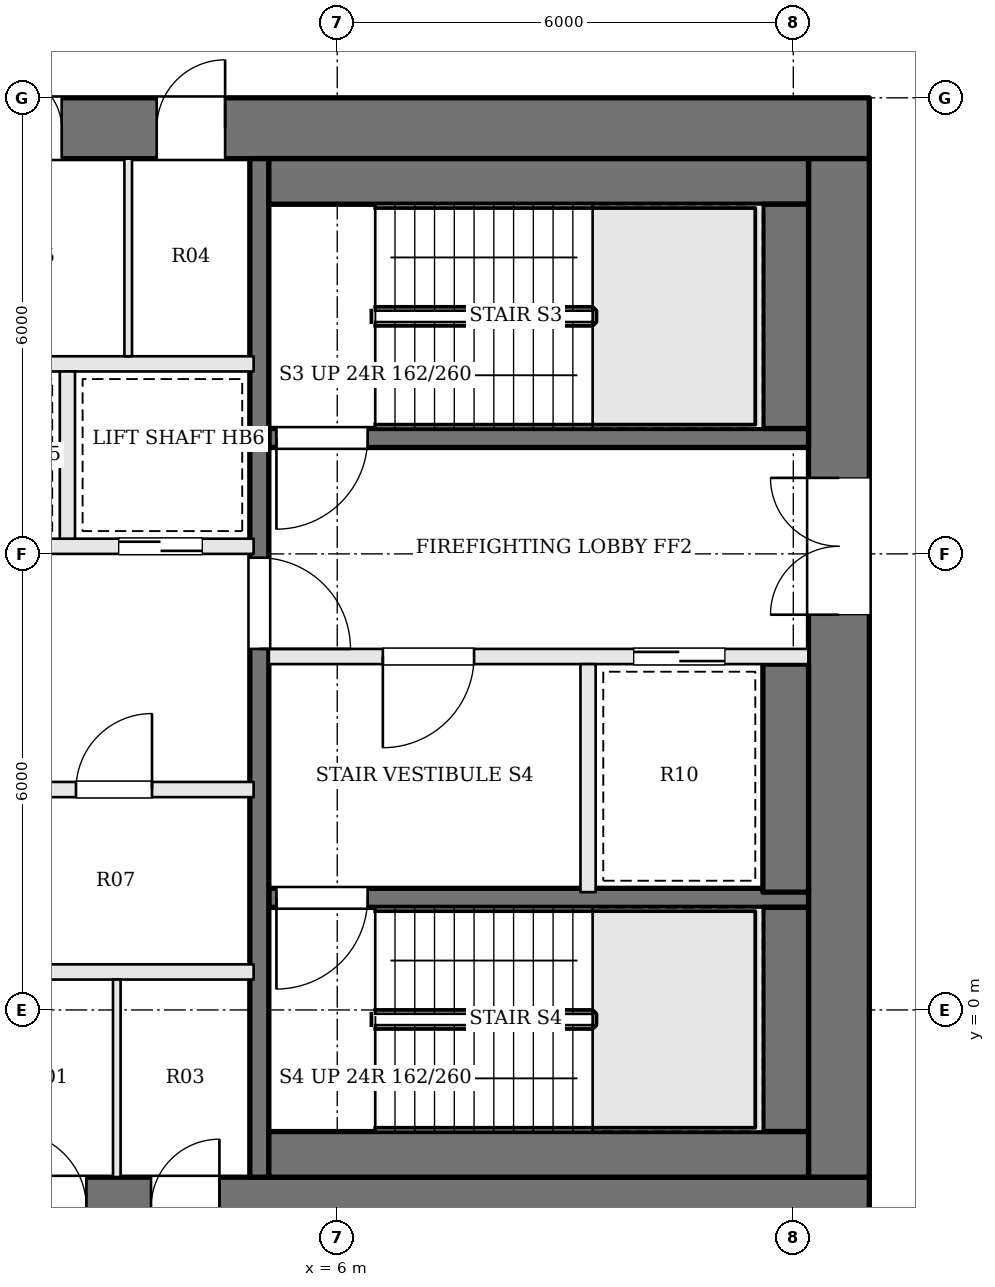
"""IFC4 building model, lengths in metres.
Left out: names, types, materials, properties, quantities, classifications, styles, units other than length and angle.
Written with IfcOpenShell. Run it as: python <this file> out.ifc"""

import sys

from ifc_helpers import new_model, si_unit, direction, frame, frame_2d, origin, place, context, subcontext, project, spatial, rectangle, extrude, element, fill, save


model = new_model("IFC4")
c1 = context("Model", 3, precision=1e-05, world=origin(), true_north=direction((0.0, 1.0)))
c2 = subcontext(c1, "Body", "Model", "MODEL_VIEW")
j1 = project(units=[si_unit("LENGTHUNIT", "METRE"), si_unit("PLANEANGLEUNIT", "RADIAN")], contexts=[c1])
p1 = place(None, origin())
s1 = spatial("IfcSite", under=j1, at=p1, CompositionType="ELEMENT")
p2 = place(p1, origin())
s2 = spatial("IfcBuilding", under=s1, at=p2, CompositionType="ELEMENT")
p3 = place(p2, frame((0.0, 0.0, 201.3)))
s3 = spatial("IfcBuildingStorey", under=s2, at=p3, CompositionType="ELEMENT", Elevation=201.3)
p4 = place(p3, frame((-13.0, 11.6, 0.0), z_axis=(0.0, 0.0, 1.0), x_axis=(1.0, 0.0, 0.0)))
e1 = element("IfcWall", 1, at=p4, inside=s3, PredefinedType="SHEAR", context=c2, shape_type="SweptSolid", body=[
    extrude(rectangle(XDim=26.0, YDim=0.8, at=frame_2d((13.0, 0.0))), origin(), (0.0, 0.0, 1.0), 3.9),
])
p5 = place(p4, frame((9.375, 0.0, 0.0)))
e2 = element("IfcOpeningElement", 2, at=p5, cuts=e1, PredefinedType="OPENING", context=c2, shape_type="SweptSolid", body=[
    extrude(rectangle(XDim=0.7, YDim=2.1, at=frame_2d((0.35, 1.05))), frame((0.0, 0.41, 0.0), z_axis=(0.0, -1.0, 0.0), x_axis=(1.0, 0.0, 0.0)), (0.0, 0.0, 1.0), 0.82),
])
p6 = place(p4, frame((12.075, 0.0, 0.0)))
e3 = element("IfcOpeningElement", 3, at=p6, cuts=e1, PredefinedType="OPENING", context=c2, shape_type="SweptSolid", body=[
    extrude(rectangle(XDim=1.0, YDim=2.1, at=frame_2d((0.5, 1.05))), frame((0.0, 0.41, 0.0), z_axis=(0.0, -1.0, 0.0), x_axis=(1.0, 0.0, 0.0)), (0.0, 0.0, 1.0), 0.82),
])
p7 = place(p4, frame((14.675, 0.0, 0.0)))
e4 = element("IfcOpeningElement", 4, at=p7, cuts=e1, PredefinedType="OPENING", context=c2, shape_type="SweptSolid", body=[
    extrude(rectangle(XDim=0.7, YDim=2.1, at=frame_2d((0.35, 1.05))), frame((0.0, 0.41, 0.0), z_axis=(0.0, -1.0, 0.0), x_axis=(1.0, 0.0, 0.0)), (0.0, 0.0, 1.0), 0.82),
])
p8 = place(p4, frame((16.625, 0.0, 0.0)))
e5 = element("IfcOpeningElement", 5, at=p8, cuts=e1, PredefinedType="OPENING", context=c2, shape_type="SweptSolid", body=[
    extrude(rectangle(XDim=0.9, YDim=2.1, at=frame_2d((0.45, 1.05))), frame((0.0, 0.41, 0.0), z_axis=(0.0, -1.0, 0.0), x_axis=(1.0, 0.0, 0.0)), (0.0, 0.0, 1.0), 0.82),
])
p9 = place(p3, frame((-13.0, -2.6, 0.0), z_axis=(0.0, 0.0, 1.0), x_axis=(1.0, 0.0, 0.0)))
e6 = element("IfcWall", 6, at=p9, inside=s3, PredefinedType="SHEAR", context=c2, shape_type="SweptSolid", body=[
    extrude(rectangle(XDim=26.0, YDim=0.8, at=frame_2d((13.0, 0.0))), origin(), (0.0, 0.0, 1.0), 3.9),
])
p10 = place(p9, frame((9.2, 0.0, 0.0)))
e7 = element("IfcOpeningElement", 7, at=p10, cuts=e6, PredefinedType="OPENING", context=c2, shape_type="SweptSolid", body=[
    extrude(rectangle(XDim=0.9, YDim=2.1, at=frame_2d((0.45, 1.05))), frame((0.0, 0.41, 0.0), z_axis=(0.0, -1.0, 0.0), x_axis=(1.0, 0.0, 0.0)), (0.0, 0.0, 1.0), 0.82),
])
p11 = place(p9, frame((12.3, 0.0, 0.0)))
e8 = element("IfcOpeningElement", 8, at=p11, cuts=e6, PredefinedType="OPENING", context=c2, shape_type="SweptSolid", body=[
    extrude(rectangle(XDim=0.9, YDim=2.1, at=frame_2d((0.45, 1.05))), frame((0.0, 0.41, 0.0), z_axis=(0.0, -1.0, 0.0), x_axis=(1.0, 0.0, 0.0)), (0.0, 0.0, 1.0), 0.82),
])
p12 = place(p9, frame((14.7, 0.0, 0.0)))
e9 = element("IfcOpeningElement", 9, at=p12, cuts=e6, PredefinedType="OPENING", context=c2, shape_type="SweptSolid", body=[
    extrude(rectangle(XDim=1.0, YDim=2.1, at=frame_2d((0.5, 1.05))), frame((0.0, 0.41, 0.0), z_axis=(0.0, -1.0, 0.0), x_axis=(1.0, 0.0, 0.0)), (0.0, 0.0, 1.0), 0.82),
])
p13 = place(p9, frame((16.55, 0.0, 0.0)))
e10 = element("IfcOpeningElement", 10, at=p13, cuts=e6, PredefinedType="OPENING", context=c2, shape_type="SweptSolid", body=[
    extrude(rectangle(XDim=0.9, YDim=2.1, at=frame_2d((0.45, 1.05))), frame((0.0, 0.41, 0.0), z_axis=(0.0, -1.0, 0.0), x_axis=(1.0, 0.0, 0.0)), (0.0, 0.0, 1.0), 0.82),
])
p14 = place(p3, frame((12.6, -2.2, 0.0), z_axis=(0.0, 0.0, 1.0), x_axis=(0.0, 1.0, 0.0)))
e11 = element("IfcWall", 11, at=p14, inside=s3, PredefinedType="SHEAR", context=c2, shape_type="SweptSolid", body=[
    extrude(rectangle(XDim=13.4, YDim=0.8, at=frame_2d((6.7, 0.0))), origin(), (0.0, 0.0, 1.0), 3.9),
])
p15 = place(p14, frame((7.4, 0.0, 0.0)))
e12 = element("IfcOpeningElement", 12, at=p15, cuts=e11, PredefinedType="OPENING", context=c2, shape_type="SweptSolid", body=[
    extrude(rectangle(XDim=1.8, YDim=2.1, at=frame_2d((0.9, 1.05))), frame((0.0, 0.41, 0.0), z_axis=(0.0, -1.0, 0.0), x_axis=(1.0, 0.0, 0.0)), (0.0, 0.0, 1.0), 0.82),
])
p16 = place(p3, frame((12.2, 7.525, 0.0), z_axis=(0.0, 0.0, 1.0), x_axis=(-1.0, 0.0, 0.0)))
e13 = element("IfcWall", 13, at=p16, inside=s3, PredefinedType="SOLIDWALL", context=c2, shape_type="SweptSolid", body=[
    extrude(rectangle(XDim=7.1, YDim=0.25, at=frame_2d((3.55, 0.0))), origin(), (0.0, 0.0, 1.0), 3.7),
])
p17 = place(p16, frame((5.8, 0.0, 0.0)))
e14 = element("IfcOpeningElement", 14, at=p17, cuts=e13, PredefinedType="OPENING", context=c2, shape_type="SweptSolid", body=[
    extrude(rectangle(XDim=1.2, YDim=2.1, at=frame_2d((0.6, 1.05))), frame((0.0, 0.135, 0.0), z_axis=(0.0, -1.0, 0.0), x_axis=(1.0, 0.0, 0.0)), (0.0, 0.0, 1.0), 0.27),
])
p18 = place(p3, frame((12.2, 4.65, 0.0), z_axis=(0.0, 0.0, 1.0), x_axis=(-1.0, 0.0, 0.0)))
e15 = element("IfcWall", 15, at=p18, inside=s3, PredefinedType="SOLIDWALL", context=c2, shape_type="SweptSolid", body=[
    extrude(rectangle(XDim=7.1, YDim=0.2, at=frame_2d((3.55, 0.0))), origin(), (0.0, 0.0, 1.0), 3.7),
])
p19 = place(p18, frame((4.4, 0.0, 0.0)))
e16 = element("IfcOpeningElement", 16, at=p19, cuts=e15, PredefinedType="OPENING", context=c2, shape_type="SweptSolid", body=[
    extrude(rectangle(XDim=1.2, YDim=2.1, at=frame_2d((0.6, 1.05))), frame((0.0, 0.11, 0.0), z_axis=(0.0, -1.0, 0.0), x_axis=(1.0, 0.0, 0.0)), (0.0, 0.0, 1.0), 0.22),
])
p20 = place(p18, frame((1.1, 0.0, 0.0)))
e17 = element("IfcOpeningElement", 17, at=p20, cuts=e15, PredefinedType="OPENING", context=c2, shape_type="SweptSolid", body=[
    extrude(rectangle(XDim=1.2, YDim=2.1, at=frame_2d((0.6, 1.05))), frame((0.0, 0.11, 0.0), z_axis=(0.0, -1.0, 0.0), x_axis=(1.0, 0.0, 0.0)), (0.0, 0.0, 1.0), 0.22),
])
p21 = place(p3, frame((12.2, 1.475, 0.0), z_axis=(0.0, 0.0, 1.0), x_axis=(-1.0, 0.0, 0.0)))
e18 = element("IfcWall", 18, at=p21, inside=s3, PredefinedType="SOLIDWALL", context=c2, shape_type="SweptSolid", body=[
    extrude(rectangle(XDim=7.1, YDim=0.25, at=frame_2d((3.55, 0.0))), origin(), (0.0, 0.0, 1.0), 3.7),
])
p22 = place(p21, frame((5.8, 0.0, 0.0)))
e19 = element("IfcOpeningElement", 19, at=p22, cuts=e18, PredefinedType="OPENING", context=c2, shape_type="SweptSolid", body=[
    extrude(rectangle(XDim=1.2, YDim=2.1, at=frame_2d((0.6, 1.05))), frame((0.0, 0.135, 0.0), z_axis=(0.0, -1.0, 0.0), x_axis=(1.0, 0.0, 0.0)), (0.0, 0.0, 1.0), 0.27),
])
p23 = place(p3, frame((9.3, 4.55, 0.0), z_axis=(0.0, 0.0, 1.0), x_axis=(0.0, -1.0, 0.0)))
e20 = element("IfcWall", 20, at=p23, inside=s3, PredefinedType="SOLIDWALL", context=c2, shape_type="SweptSolid", body=[
    extrude(rectangle(XDim=3.0, YDim=0.2, at=frame_2d((1.5, 0.0))), origin(), (0.0, 0.0, 1.0), 3.7),
])
p24 = place(p3, frame((4.975, 11.2, 0.0), z_axis=(0.0, 0.0, 1.0), x_axis=(0.0, -1.0, 0.0)))
e21 = element("IfcWall", 21, at=p24, inside=s3, PredefinedType="SOLIDWALL", context=c2, shape_type="SweptSolid", body=[
    extrude(rectangle(XDim=13.4, YDim=0.25, at=frame_2d((6.7, 0.0))), origin(), (0.0, 0.0, 1.0), 3.7),
])
p25 = place(p24, frame((5.25, 0.0, 0.0)))
e22 = element("IfcOpeningElement", 22, at=p25, cuts=e21, PredefinedType="OPENING", context=c2, shape_type="SweptSolid", body=[
    extrude(rectangle(XDim=1.2, YDim=2.1, at=frame_2d((0.6, 1.05))), frame((0.0, 0.135, 0.0), z_axis=(0.0, -1.0, 0.0), x_axis=(1.0, 0.0, 0.0)), (0.0, 0.0, 1.0), 0.27),
])
p26 = place(p3, frame((12.2, 10.9, 0.0), z_axis=(0.0, 0.0, 1.0), x_axis=(-1.0, 0.0, 0.0)))
e23 = element("IfcWall", 23, at=p26, inside=s3, PredefinedType="SOLIDWALL", context=c2, shape_type="SweptSolid", body=[
    extrude(rectangle(XDim=7.1, YDim=0.6, at=frame_2d((3.55, 0.0))), origin(), (0.0, 0.0, 1.0), 3.7),
])
p27 = place(p3, frame((11.9, 10.6, 0.0), z_axis=(0.0, 0.0, 1.0), x_axis=(0.0, -1.0, 0.0)))
e24 = element("IfcWall", 24, at=p27, inside=s3, PredefinedType="SOLIDWALL", context=c2, shape_type="SweptSolid", body=[
    extrude(rectangle(XDim=2.95, YDim=0.6, at=frame_2d((1.475, 0.0))), origin(), (0.0, 0.0, 1.0), 3.7),
])
p28 = place(p3, frame((11.9, 4.55, 0.0), z_axis=(0.0, 0.0, 1.0), x_axis=(0.0, -1.0, 0.0)))
e25 = element("IfcWall", 25, at=p28, inside=s3, PredefinedType="SOLIDWALL", context=c2, shape_type="SweptSolid", body=[
    extrude(rectangle(XDim=3.0, YDim=0.6, at=frame_2d((1.5, 0.0))), origin(), (0.0, 0.0, 1.0), 3.7),
])
p29 = place(p3, frame((11.9, 1.35, 0.0), z_axis=(0.0, 0.0, 1.0), x_axis=(0.0, -1.0, 0.0)))
e26 = element("IfcWall", 26, at=p29, inside=s3, PredefinedType="SOLIDWALL", context=c2, shape_type="SweptSolid", body=[
    extrude(rectangle(XDim=2.95, YDim=0.6, at=frame_2d((1.475, 0.0))), origin(), (0.0, 0.0, 1.0), 3.7),
])
p30 = place(p3, frame((12.2, -1.9, 0.0), z_axis=(0.0, 0.0, 1.0), x_axis=(-1.0, 0.0, 0.0)))
e27 = element("IfcWall", 27, at=p30, inside=s3, PredefinedType="SOLIDWALL", context=c2, shape_type="SweptSolid", body=[
    extrude(rectangle(XDim=7.1, YDim=0.6, at=frame_2d((3.55, 0.0))), origin(), (0.0, 0.0, 1.0), 3.7),
])
p31 = place(p3, frame((-4.9, 0.5, 0.0), z_axis=(0.0, 0.0, 1.0), x_axis=(1.0, 0.0, 0.0)))
e28 = element("IfcWall", 28, at=p31, inside=s3, PredefinedType="SOLIDWALL", context=c2, shape_type="SweptSolid", body=[
    extrude(rectangle(XDim=9.8, YDim=0.2, at=frame_2d((4.9, 0.0))), origin(), (0.0, 0.0, 1.0), 3.7),
])
p32 = place(p3, frame((-4.9, 2.9, 0.0), z_axis=(0.0, 0.0, 1.0), x_axis=(1.0, 0.0, 0.0)))
e29 = element("IfcWall", 29, at=p32, inside=s3, PredefinedType="SOLIDWALL", context=c2, shape_type="SweptSolid", body=[
    extrude(rectangle(XDim=9.8, YDim=0.2, at=frame_2d((4.9, 0.0))), origin(), (0.0, 0.0, 1.0), 3.7),
])
p33 = place(p32, frame((0.675, 0.0, 0.0)))
e30 = element("IfcOpeningElement", 30, at=p33, cuts=e29, PredefinedType="OPENING", context=c2, shape_type="SweptSolid", body=[
    extrude(rectangle(XDim=1.1, YDim=2.1, at=frame_2d((0.55, 1.05))), frame((0.0, 0.11, 0.0), z_axis=(0.0, -1.0, 0.0), x_axis=(1.0, 0.0, 0.0)), (0.0, 0.0, 1.0), 0.22),
])
p34 = place(p32, frame((2.613, 0.0, 0.0)))
e31 = element("IfcOpeningElement", 31, at=p34, cuts=e29, PredefinedType="OPENING", context=c2, shape_type="SweptSolid", body=[
    extrude(rectangle(XDim=0.9, YDim=2.1, at=frame_2d((0.45, 1.05))), frame((0.0, 0.11, 0.0), z_axis=(0.0, -1.0, 0.0), x_axis=(1.0, 0.0, 0.0)), (0.0, 0.0, 1.0), 0.22),
])
p35 = place(p32, frame((4.35, 0.0, 0.0)))
e32 = element("IfcOpeningElement", 32, at=p35, cuts=e29, PredefinedType="OPENING", context=c2, shape_type="SweptSolid", body=[
    extrude(rectangle(XDim=1.1, YDim=2.1, at=frame_2d((0.55, 1.05))), frame((0.0, 0.11, 0.0), z_axis=(0.0, -1.0, 0.0), x_axis=(1.0, 0.0, 0.0)), (0.0, 0.0, 1.0), 0.22),
])
p36 = place(p32, frame((7.463, 0.0, 0.0)))
e33 = element("IfcOpeningElement", 33, at=p36, cuts=e29, PredefinedType="OPENING", context=c2, shape_type="SweptSolid", body=[
    extrude(rectangle(XDim=1.0, YDim=2.1, at=frame_2d((0.5, 1.05))), frame((0.0, 0.11, 0.0), z_axis=(0.0, -1.0, 0.0), x_axis=(1.0, 0.0, 0.0)), (0.0, 0.0, 1.0), 0.22),
])
p37 = place(p3, frame((-4.9, 6.1, 0.0), z_axis=(0.0, 0.0, 1.0), x_axis=(1.0, 0.0, 0.0)))
e34 = element("IfcWall", 34, at=p37, inside=s3, PredefinedType="SOLIDWALL", context=c2, shape_type="SweptSolid", body=[
    extrude(rectangle(XDim=9.8, YDim=0.2, at=frame_2d((4.9, 0.0))), origin(), (0.0, 0.0, 1.0), 3.7),
])
p38 = place(p37, frame((0.675, 0.0, 0.0)))
e35 = element("IfcOpeningElement", 35, at=p38, cuts=e34, PredefinedType="OPENING", context=c2, shape_type="SweptSolid", body=[
    extrude(rectangle(XDim=1.1, YDim=2.1, at=frame_2d((0.55, 1.05))), frame((0.0, 0.11, 0.0), z_axis=(0.0, -1.0, 0.0), x_axis=(1.0, 0.0, 0.0)), (0.0, 0.0, 1.0), 0.22),
])
p39 = place(p37, frame((3.125, 0.0, 0.0)))
e36 = element("IfcOpeningElement", 36, at=p39, cuts=e34, PredefinedType="OPENING", context=c2, shape_type="SweptSolid", body=[
    extrude(rectangle(XDim=1.1, YDim=2.1, at=frame_2d((0.55, 1.05))), frame((0.0, 0.11, 0.0), z_axis=(0.0, -1.0, 0.0), x_axis=(1.0, 0.0, 0.0)), (0.0, 0.0, 1.0), 0.22),
])
p40 = place(p37, frame((5.575, 0.0, 0.0)))
e37 = element("IfcOpeningElement", 37, at=p40, cuts=e34, PredefinedType="OPENING", context=c2, shape_type="SweptSolid", body=[
    extrude(rectangle(XDim=1.1, YDim=2.1, at=frame_2d((0.55, 1.05))), frame((0.0, 0.11, 0.0), z_axis=(0.0, -1.0, 0.0), x_axis=(1.0, 0.0, 0.0)), (0.0, 0.0, 1.0), 0.22),
])
p41 = place(p37, frame((8.025, 0.0, 0.0)))
e38 = element("IfcOpeningElement", 38, at=p41, cuts=e34, PredefinedType="OPENING", context=c2, shape_type="SweptSolid", body=[
    extrude(rectangle(XDim=1.1, YDim=2.1, at=frame_2d((0.55, 1.05))), frame((0.0, 0.11, 0.0), z_axis=(0.0, -1.0, 0.0), x_axis=(1.0, 0.0, 0.0)), (0.0, 0.0, 1.0), 0.22),
])
p42 = place(p3, frame((-4.9, 8.5, 0.0), z_axis=(0.0, 0.0, 1.0), x_axis=(1.0, 0.0, 0.0)))
e39 = element("IfcWall", 39, at=p42, inside=s3, PredefinedType="SOLIDWALL", context=c2, shape_type="SweptSolid", body=[
    extrude(rectangle(XDim=9.8, YDim=0.2, at=frame_2d((4.9, 0.0))), origin(), (0.0, 0.0, 1.0), 3.7),
])
p43 = place(p3, frame((2.45, 6.2, 0.0), z_axis=(0.0, 0.0, 1.0), x_axis=(0.0, 1.0, 0.0)))
e40 = element("IfcWall", 40, at=p43, inside=s3, PredefinedType="SOLIDWALL", context=c2, shape_type="SweptSolid", body=[
    extrude(rectangle(XDim=2.2, YDim=0.2, at=frame_2d((1.1, 0.0))), origin(), (0.0, 0.0, 1.0), 3.7),
])
for number, where, z_axis, x_axis in (
    (41, (3.1, -2.2, 0.0), (0.0, 0.0, 1.0), (0.0, 1.0, 0.0)),
    (42, (3.25, 8.6, 0.0), (0.0, 0.0, 1.0), (0.0, 1.0, 0.0)),
):
    element("IfcWall", number, at=place(p3, frame(where, z_axis=z_axis, x_axis=x_axis)), inside=s3, PredefinedType="PARTITIONING", context=c2, shape_type="SweptSolid", body=[
        extrude(rectangle(XDim=2.6, YDim=0.1, at=frame_2d((1.3, 0.0))), origin(), (0.0, 0.0, 1.0), 3.7),
    ])
p44 = place(p15, origin())
e43 = element("IfcDoor", 43, at=p44, inside=s3, OperationType="DOUBLE_DOOR_SINGLE_SWING", PredefinedType="DOOR", context=c2, shape_type="SweptSolid", body=[
    extrude(rectangle(XDim=1.8, YDim=2.1, at=frame_2d((0.9, 1.05))), frame((0.0, 0.025, 0.0), z_axis=(0.0, -1.0, 0.0), x_axis=(1.0, 0.0, 0.0)), (0.0, 0.0, 1.0), 0.05),
])
fill(e12, e43)
p45 = place(p25, origin())
e44 = element("IfcDoor", 44, at=p45, inside=s3, OperationType="SINGLE_SWING_RIGHT", PredefinedType="DOOR", context=c2, shape_type="SweptSolid", body=[
    extrude(rectangle(XDim=1.2, YDim=2.1, at=frame_2d((0.6, 1.05))), frame((0.0, 0.025, 0.0), z_axis=(0.0, -1.0, 0.0), x_axis=(1.0, 0.0, 0.0)), (0.0, 0.0, 1.0), 0.05),
])
fill(e22, e44)
p46 = place(p19, origin())
e45 = element("IfcDoor", 45, at=p46, inside=s3, OperationType="SINGLE_SWING_RIGHT", PredefinedType="DOOR", context=c2, shape_type="SweptSolid", body=[
    extrude(rectangle(XDim=1.2, YDim=2.1, at=frame_2d((0.6, 1.05))), frame((0.0, 0.025, 0.0), z_axis=(0.0, -1.0, 0.0), x_axis=(1.0, 0.0, 0.0)), (0.0, 0.0, 1.0), 0.05),
])
fill(e16, e45)
p47 = place(p17, origin())
e46 = element("IfcDoor", 46, at=p47, inside=s3, OperationType="SINGLE_SWING_RIGHT", PredefinedType="DOOR", context=c2, shape_type="SweptSolid", body=[
    extrude(rectangle(XDim=1.2, YDim=2.1, at=frame_2d((0.6, 1.05))), frame((0.0, 0.025, 0.0), z_axis=(0.0, -1.0, 0.0), x_axis=(1.0, 0.0, 0.0)), (0.0, 0.0, 1.0), 0.05),
])
fill(e14, e46)
p48 = place(p22, origin())
e47 = element("IfcDoor", 47, at=p48, inside=s3, OperationType="SINGLE_SWING_RIGHT", PredefinedType="DOOR", context=c2, shape_type="SweptSolid", body=[
    extrude(rectangle(XDim=1.2, YDim=2.1, at=frame_2d((0.6, 1.05))), frame((0.0, 0.025, 0.0), z_axis=(0.0, -1.0, 0.0), x_axis=(1.0, 0.0, 0.0)), (0.0, 0.0, 1.0), 0.05),
])
fill(e19, e47)
p49 = place(p20, origin())
e48 = element("IfcDoor", 48, at=p49, inside=s3, OperationType="SLIDING_TO_RIGHT", PredefinedType="DOOR", context=c2, shape_type="SweptSolid", body=[
    extrude(rectangle(XDim=1.2, YDim=2.1, at=frame_2d((0.6, 1.05))), frame((0.0, 0.025, 0.0), z_axis=(0.0, -1.0, 0.0), x_axis=(1.0, 0.0, 0.0)), (0.0, 0.0, 1.0), 0.05),
])
fill(e17, e48)
p50 = place(p36, origin())
e49 = element("IfcDoor", 49, at=p50, inside=s3, OperationType="SINGLE_SWING_RIGHT", PredefinedType="DOOR", context=c2, shape_type="SweptSolid", body=[
    extrude(rectangle(XDim=1.0, YDim=2.1, at=frame_2d((0.5, 1.05))), frame((0.0, 0.025, 0.0), z_axis=(0.0, -1.0, 0.0), x_axis=(1.0, 0.0, 0.0)), (0.0, 0.0, 1.0), 0.05),
])
fill(e33, e49)
p51 = place(p41, origin())
e50 = element("IfcDoor", 50, at=p51, inside=s3, OperationType="SLIDING_TO_LEFT", PredefinedType="DOOR", context=c2, shape_type="SweptSolid", body=[
    extrude(rectangle(XDim=1.1, YDim=2.1, at=frame_2d((0.55, 1.05))), frame((0.0, 0.025, 0.0), z_axis=(0.0, -1.0, 0.0), x_axis=(1.0, 0.0, 0.0)), (0.0, 0.0, 1.0), 0.05),
])
fill(e38, e50)
p52 = place(p12, origin())
e51 = element("IfcDoor", 51, at=p52, inside=s3, OperationType="SINGLE_SWING_LEFT", PredefinedType="DOOR", context=c2, shape_type="SweptSolid", body=[
    extrude(rectangle(XDim=1.0, YDim=2.1, at=frame_2d((0.5, 1.05))), frame((0.0, 0.025, 0.0), z_axis=(0.0, -1.0, 0.0), x_axis=(1.0, 0.0, 0.0)), (0.0, 0.0, 1.0), 0.05),
])
fill(e9, e51)
p53 = place(p13, origin())
e52 = element("IfcDoor", 52, at=p53, inside=s3, OperationType="SINGLE_SWING_RIGHT", PredefinedType="DOOR", context=c2, shape_type="SweptSolid", body=[
    extrude(rectangle(XDim=0.9, YDim=2.1, at=frame_2d((0.45, 1.05))), frame((0.0, 0.025, 0.0), z_axis=(0.0, -1.0, 0.0), x_axis=(1.0, 0.0, 0.0)), (0.0, 0.0, 1.0), 0.05),
])
fill(e10, e52)
p54 = place(p7, origin())
e53 = element("IfcDoor", 53, at=p54, inside=s3, OperationType="SINGLE_SWING_LEFT", PredefinedType="DOOR", context=c2, shape_type="SweptSolid", body=[
    extrude(rectangle(XDim=0.7, YDim=2.1, at=frame_2d((0.35, 1.05))), frame((0.0, 0.025, 0.0), z_axis=(0.0, -1.0, 0.0), x_axis=(1.0, 0.0, 0.0)), (0.0, 0.0, 1.0), 0.05),
])
fill(e4, e53)
p55 = place(p8, origin())
e54 = element("IfcDoor", 54, at=p55, inside=s3, OperationType="SINGLE_SWING_RIGHT", PredefinedType="DOOR", context=c2, shape_type="SweptSolid", body=[
    extrude(rectangle(XDim=0.9, YDim=2.1, at=frame_2d((0.45, 1.05))), frame((0.0, 0.025, 0.0), z_axis=(0.0, -1.0, 0.0), x_axis=(1.0, 0.0, 0.0)), (0.0, 0.0, 1.0), 0.05),
])
fill(e5, e54)
save(model, sys.argv[1])
